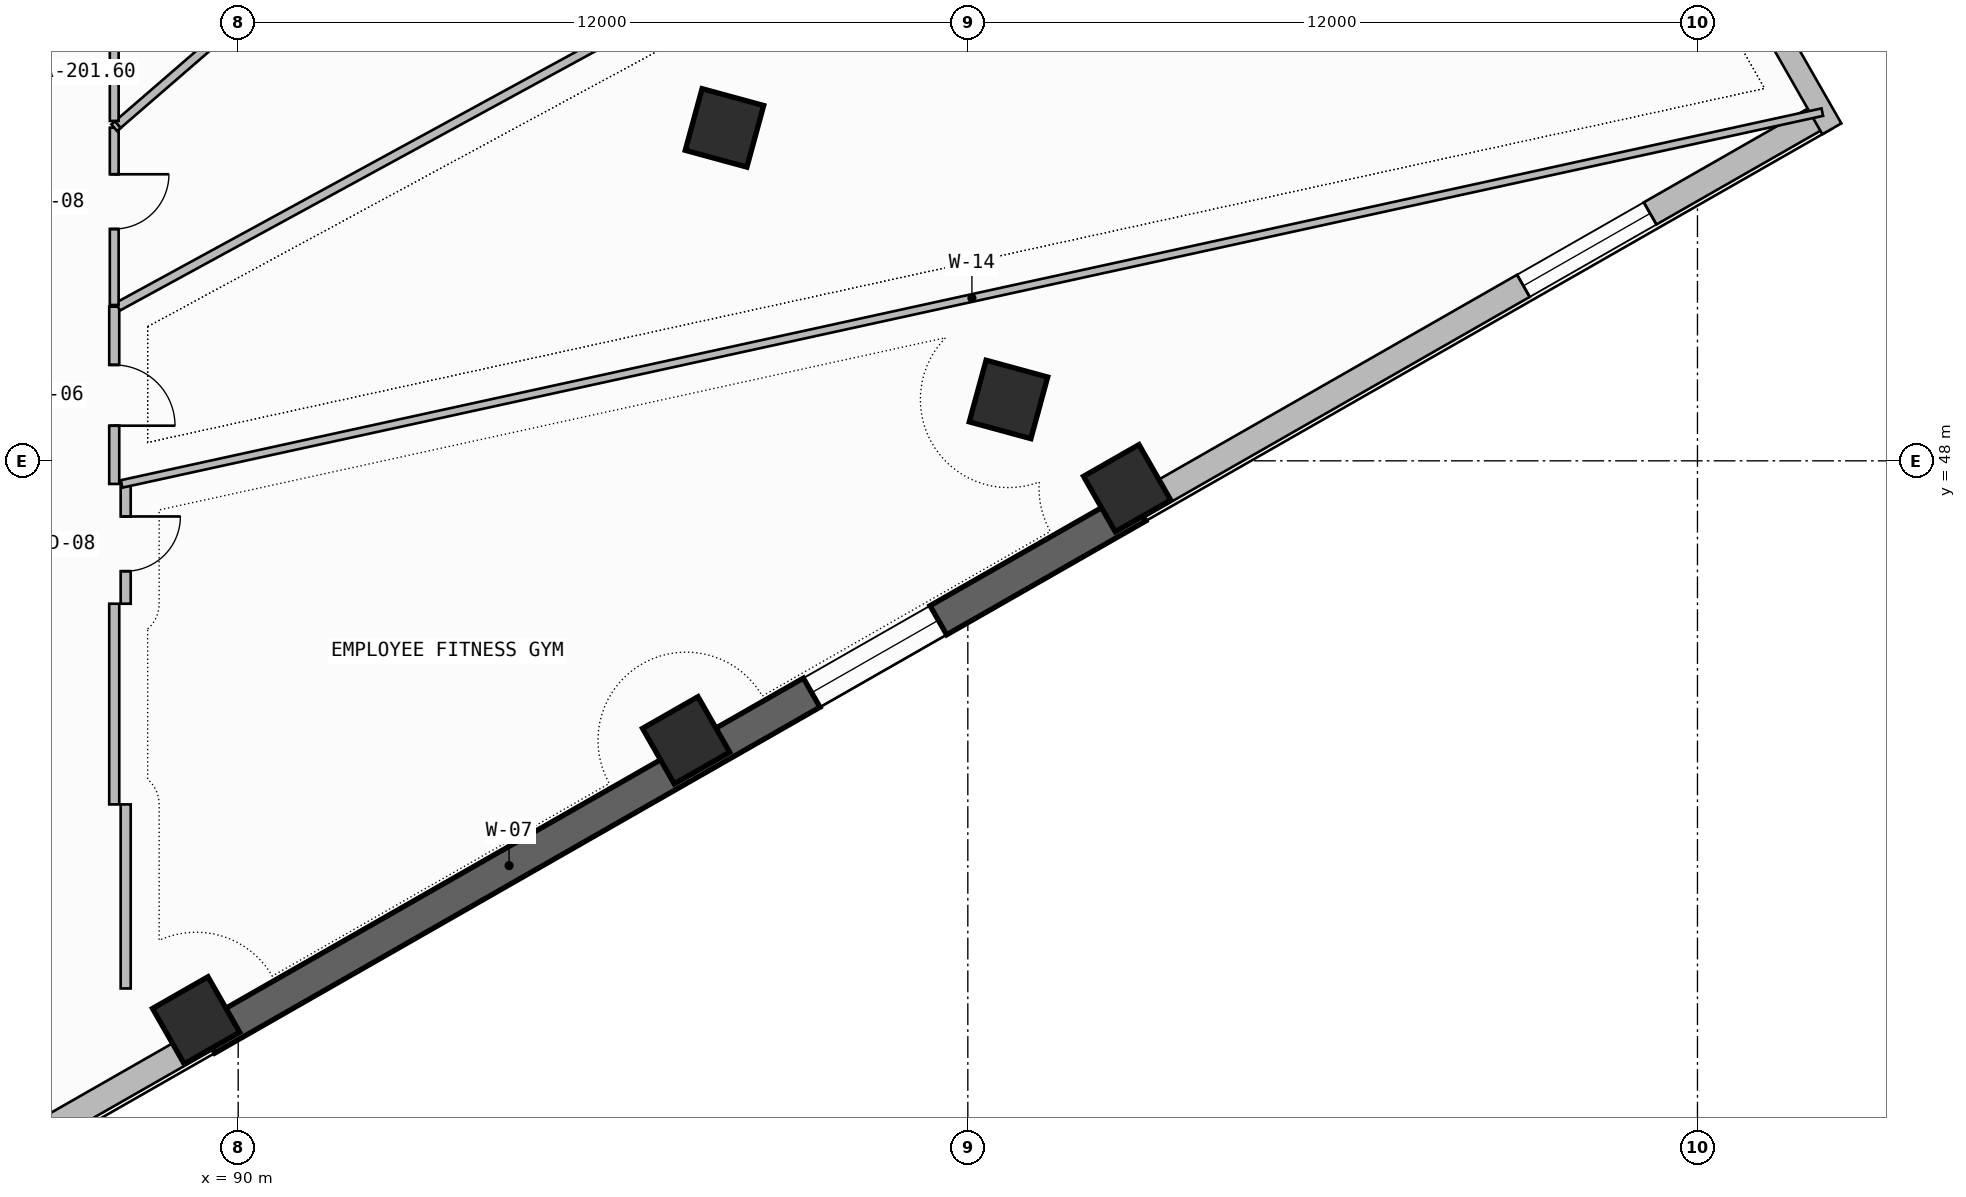
"""IFC4 building model, lengths in metres.
Left out: names, types, materials, properties, quantities, classifications, styles, units other than length and angle.
Written with IfcOpenShell. Run it as: python <this file> out.ifc"""

import sys

from ifc_helpers import new_model, si_unit, direction, frame, frame_2d, origin, origin_2d, place, context, subcontext, project, spatial, rectangle, extrude, element, fill, save


model = new_model("IFC4")
c1 = context("Model", 3, precision=1e-05, world=origin(), true_north=direction((0.0, 1.0)))
c2 = subcontext(c1, "Body", "Model", "MODEL_VIEW")
j1 = project(units=[si_unit("LENGTHUNIT", "METRE"), si_unit("PLANEANGLEUNIT", "RADIAN")], contexts=[c1])
p1 = place(None, origin())
s1 = spatial("IfcSite", under=j1, at=p1, CompositionType="ELEMENT")
p2 = place(p1, origin())
s2 = spatial("IfcBuilding", under=s1, at=p2, CompositionType="ELEMENT")
p3 = place(p2, frame((0.0, 0.0, 214.98)))
s3 = spatial("IfcBuildingStorey", under=s2, at=p3, CompositionType="ELEMENT", Elevation=214.98)
for number, where, z_axis, x_axis in (
    (1, (89.308, 38.799, 0.0), (0.0, 0.0, 1.0), (0.868, 0.496, 0.0)),
    (2, (97.367, 43.405, 0.0), (0.0, 0.0, 1.0), (0.868, 0.496, 0.0)),
    (3, (104.62, 47.55, 0.0), (0.0, 0.0, 1.0), (0.868, 0.496, 0.0)),
    (4, (102.669, 49.01, 0.0), (0.0, 0.0, 1.0), (0.263, 0.965, 0.0)),
    (5, (97.998, 53.475, 0.0), (0.0, 0.0, 1.0), (0.263, 0.965, 0.0)),
):
    element("IfcColumn", number, at=place(p3, frame(where, z_axis=z_axis, x_axis=x_axis)), inside=s3, PredefinedType="COLUMN", context=c2, shape_type="SweptSolid", body=[
        extrude(rectangle(XDim=1.05, YDim=1.05, at=origin_2d()), origin(), (0.0, 0.0, 1.0), 3.52),
    ])
p4 = place(p3, frame((86.1, 36.568, 0.0), z_axis=(0.0, 0.0, 1.0), x_axis=(0.868192956745, 0.496226752461, 0.0)))
e6 = element("IfcWall", 6, at=p4, inside=s3, PredefinedType="SOLIDWALL", context=c2, shape_type="SweptSolid", body=[
    extrude(rectangle(XDim=3.892, YDim=0.42, at=frame_2d((1.946, 0.0))), origin(), (0.0, 0.0, 1.0), 2.245),
])
p5 = place(p3, frame((89.479, 38.499, -0.26), z_axis=(0.0, 0.0, 1.0), x_axis=(0.868197136736, 0.496219439123, 0.0)))
e7 = element("IfcWall", 7, at=p5, inside=s3, PredefinedType="SHEAR", context=c2, shape_type="SweptSolid", body=[
    extrude(rectangle(XDim=17.636, YDim=0.55, at=frame_2d((8.818, 0.0))), origin(), (0.0, 0.0, 1.0), 3.52),
])
p6 = place(p5, frame((11.464, 0.0, 1.1)))
e8 = element("IfcOpeningElement", 8, at=p6, cuts=e7, PredefinedType="OPENING", context=c2, shape_type="SweptSolid", body=[
    extrude(rectangle(XDim=2.4, YDim=1.2, at=frame_2d((1.2, 0.6))), frame((0.0, 0.285, 0.0), z_axis=(0.0, -1.0, 0.0), x_axis=(1.0, 0.0, 0.0)), (0.0, 0.0, 1.0), 0.57),
])
p7 = place(p3, frame((104.791, 47.25, 0.0), z_axis=(0.0, 0.0, 1.0), x_axis=(0.868193423982, 0.496225934987, 0.0)))
e9 = element("IfcWall", 9, at=p7, inside=s3, PredefinedType="SOLIDWALL", context=c2, shape_type="SweptSolid", body=[
    extrude(rectangle(XDim=12.995, YDim=0.42, at=frame_2d((6.498, 0.0))), origin(), (0.0, 0.0, 1.0), 2.245),
])
p8 = place(p7, frame((7.31, 0.0, 0.965)))
e10 = element("IfcOpeningElement", 10, at=p8, cuts=e9, PredefinedType="OPENING", context=c2, shape_type="SweptSolid", body=[
    extrude(rectangle(XDim=2.4, YDim=1.2, at=frame_2d((1.2, 0.6))), frame((0.0, 0.22, 0.0), z_axis=(0.0, -1.0, 0.0), x_axis=(1.0, 0.0, 0.0)), (0.0, 0.0, 1.0), 0.44),
])
p9 = place(p3, frame((116.21, 53.46, 0.0), z_axis=(0.0, 0.0, 1.0), x_axis=(-0.496215637313, 0.868199309655, 0.0)))
e11 = element("IfcWall", 11, at=p9, inside=s3, PredefinedType="SOLIDWALL", context=c2, shape_type="SweptSolid", body=[
    extrude(rectangle(XDim=2.399, YDim=0.36, at=frame_2d((1.2, 0.0))), origin(), (0.0, 0.0, 1.0), 3.26),
])
p10 = place(p3, frame((87.961, 42.35, 0.0), z_axis=(0.0, 0.0, 1.0), x_axis=(0.0, 1.0, 0.0)))
e12 = element("IfcWall", 12, at=p10, inside=s3, PredefinedType="PARTITIONING", context=c2, shape_type="SweptSolid", body=[
    extrude(rectangle(XDim=3.3, YDim=0.165, at=frame_2d((1.65, 0.0))), origin(), (0.0, 0.0, 1.0), 2.745),
])
p11 = place(p3, frame((88.15, 39.323, 0.0), z_axis=(0.0, 0.0, 1.0), x_axis=(0.0, 1.0, 0.0)))
e13 = element("IfcWall", 13, at=p11, inside=s3, PredefinedType="PARTITIONING", context=c2, shape_type="SweptSolid", body=[
    extrude(rectangle(XDim=3.027, YDim=0.165, at=frame_2d((1.514, 0.0))), origin(), (0.0, 0.0, 1.0), 2.745),
])
p12 = place(p3, frame((88.15, 45.65, 0.0), z_axis=(0.0, 0.0, 1.0), x_axis=(0.0, 1.0, 0.0)))
e14 = element("IfcWall", 14, at=p12, inside=s3, PredefinedType="PARTITIONING", context=c2, shape_type="SweptSolid", body=[
    extrude(rectangle(XDim=1.97, YDim=0.165, at=frame_2d((0.985, 0.0))), origin(), (0.0, 0.0, 1.0), 3.26),
])
p13 = place(p12, frame((0.535, 0.0, 0.0)))
e15 = element("IfcOpeningElement", 15, at=p13, cuts=e14, PredefinedType="OPENING", context=c2, shape_type="SweptSolid", body=[
    extrude(rectangle(XDim=0.9, YDim=2.1, at=frame_2d((0.45, 1.05))), frame((0.0, 0.093, 0.0), z_axis=(0.0, -1.0, 0.0), x_axis=(1.0, 0.0, 0.0)), (0.0, 0.0, 1.0), 0.185),
])
p14 = place(p3, frame((88.082, 47.62, 0.0), z_axis=(0.0, 0.0, 1.0), x_axis=(0.976930213731, 0.21355879167, 0.0)))
e16 = element("IfcWall", 16, at=p14, inside=s3, PredefinedType="PARTITIONING", context=c2, shape_type="SweptSolid", body=[
    extrude(rectangle(XDim=28.631, YDim=0.125, at=frame_2d((14.316, 0.0))), origin(), (0.0, 0.0, 1.0), 2.645),
])
p15 = place(p3, frame((87.961, 47.62, 0.0), z_axis=(0.0, 0.0, 1.0), x_axis=(0.0, 1.0, 0.0)))
e17 = element("IfcWall", 17, at=p15, inside=s3, PredefinedType="PARTITIONING", context=c2, shape_type="SweptSolid", body=[
    extrude(rectangle(XDim=2.915, YDim=0.165, at=frame_2d((1.458, 0.0))), origin(), (0.0, 0.0, 1.0), 3.26),
])
p16 = place(p15, frame((0.958, 0.0, 0.0)))
e18 = element("IfcOpeningElement", 18, at=p16, cuts=e17, PredefinedType="OPENING", context=c2, shape_type="SweptSolid", body=[
    extrude(rectangle(XDim=1.0, YDim=2.2, at=frame_2d((0.5, 1.1))), frame((0.0, 0.093, 0.0), z_axis=(0.0, -1.0, 0.0), x_axis=(1.0, 0.0, 0.0)), (0.0, 0.0, 1.0), 0.185),
])
p17 = place(p3, frame((88.021, 50.535, 0.0), z_axis=(0.0, 0.0, 1.0), x_axis=(0.877922622052, 0.478802537264, 0.0)))
e19 = element("IfcWall", 19, at=p17, inside=s3, PredefinedType="PARTITIONING", context=c2, shape_type="SweptSolid", body=[
    extrude(rectangle(XDim=18.625, YDim=0.145, at=frame_2d((9.313, 0.0))), origin(), (0.0, 0.0, 1.0), 2.645),
])
p18 = place(p3, frame((87.961, 50.563, 0.0), z_axis=(0.0, 0.0, 1.0), x_axis=(0.0, 1.0, 0.0)))
e20 = element("IfcWall", 20, at=p18, inside=s3, PredefinedType="PARTITIONING", context=c2, shape_type="SweptSolid", body=[
    extrude(rectangle(XDim=2.915, YDim=0.145, at=frame_2d((1.458, 0.0))), origin(), (0.0, 0.0, 1.0), 3.26),
])
p19 = place(p18, frame((1.25, 0.0, 0.0)))
e21 = element("IfcOpeningElement", 21, at=p19, cuts=e20, PredefinedType="OPENING", context=c2, shape_type="SweptSolid", body=[
    extrude(rectangle(XDim=0.9, YDim=2.1, at=frame_2d((0.45, 1.05))), frame((0.0, 0.083, 0.0), z_axis=(0.0, -1.0, 0.0), x_axis=(1.0, 0.0, 0.0)), (0.0, 0.0, 1.0), 0.165),
])
p20 = place(p3, frame((87.961, 53.478, 0.0), z_axis=(0.0, 0.0, 1.0), x_axis=(0.757514976672, 0.652817784774, 0.0)))
e22 = element("IfcWall", 22, at=p20, inside=s3, PredefinedType="PARTITIONING", context=c2, shape_type="SweptSolid", body=[
    extrude(rectangle(XDim=0.079, YDim=0.145, at=frame_2d((0.04, 0.0))), origin(), (0.0, 0.0, 1.0), 3.26),
])
p21 = place(p3, frame((88.021, 53.53, 0.0), z_axis=(0.0, 0.0, 1.0), x_axis=(0.756178143134, 0.654365811948, 0.0)))
e23 = element("IfcWall", 23, at=p21, inside=s3, PredefinedType="PARTITIONING", context=c2, shape_type="SweptSolid", body=[
    extrude(rectangle(XDim=11.541, YDim=0.145, at=frame_2d((5.771, 0.0))), origin(), (0.0, 0.0, 1.0), 2.645),
])
p22 = place(p3, frame((87.961, 53.59, 0.0), z_axis=(0.0, 0.0, 1.0), x_axis=(0.0, 1.0, 0.0)))
e24 = element("IfcWall", 24, at=p22, inside=s3, PredefinedType="PARTITIONING", context=c2, shape_type="SweptSolid", body=[
    extrude(rectangle(XDim=5.272, YDim=0.145, at=frame_2d((2.636, 0.0))), origin(), (0.0, 0.0, 1.0), 2.745),
])
p23 = place(p22, frame((2.782, 0.0, 0.0)))
e25 = element("IfcOpeningElement", 25, at=p23, cuts=e24, PredefinedType="OPENING", context=c2, shape_type="SweptSolid", body=[
    extrude(rectangle(XDim=0.9, YDim=2.1, at=frame_2d((0.45, 1.05))), frame((0.0, 0.083, 0.0), z_axis=(0.0, -1.0, 0.0), x_axis=(1.0, 0.0, 0.0)), (0.0, 0.0, 1.0), 0.165),
])
p24 = place(p6, origin())
e26 = element("IfcWindow", 26, at=p24, inside=s3, PartitioningType="SINGLE_PANEL", PredefinedType="WINDOW", context=c2, shape_type="SweptSolid", body=[
    extrude(rectangle(XDim=2.4, YDim=1.2, at=frame_2d((1.2, 0.6))), frame((0.0, 0.03, 0.0), z_axis=(0.0, -1.0, 0.0), x_axis=(1.0, 0.0, 0.0)), (0.0, 0.0, 1.0), 0.06),
])
fill(e8, e26)
p25 = place(p8, origin())
e27 = element("IfcWindow", 27, at=p25, inside=s3, PartitioningType="SINGLE_PANEL", PredefinedType="WINDOW", context=c2, shape_type="SweptSolid", body=[
    extrude(rectangle(XDim=2.4, YDim=1.2, at=frame_2d((1.2, 0.6))), frame((0.0, 0.03, 0.0), z_axis=(0.0, -1.0, 0.0), x_axis=(1.0, 0.0, 0.0)), (0.0, 0.0, 1.0), 0.06),
])
fill(e10, e27)
p26 = place(p13, frame((0.9, 0.0, 0.0), z_axis=(0.0, 0.0, 1.0), x_axis=(-1.0, 0.0, 0.0)))
e28 = element("IfcDoor", 28, at=p26, inside=s3, OperationType="SINGLE_SWING_LEFT", PredefinedType="DOOR", context=c2, shape_type="SweptSolid", body=[
    extrude(rectangle(XDim=0.9, YDim=2.1, at=frame_2d((0.45, 1.05))), frame((0.0, 0.025, 0.0), z_axis=(0.0, -1.0, 0.0), x_axis=(1.0, 0.0, 0.0)), (0.0, 0.0, 1.0), 0.05),
])
fill(e15, e28)
p27 = place(p16, frame((1.0, 0.0, 0.0), z_axis=(0.0, 0.0, 1.0), x_axis=(-1.0, 0.0, 0.0)))
e29 = element("IfcDoor", 29, at=p27, inside=s3, OperationType="SINGLE_SWING_RIGHT", PredefinedType="DOOR", context=c2, shape_type="SweptSolid", body=[
    extrude(rectangle(XDim=1.0, YDim=2.2, at=frame_2d((0.5, 1.1))), frame((0.0, 0.025, 0.0), z_axis=(0.0, -1.0, 0.0), x_axis=(1.0, 0.0, 0.0)), (0.0, 0.0, 1.0), 0.05),
])
fill(e18, e29)
p28 = place(p19, frame((0.9, 0.0, 0.0), z_axis=(0.0, 0.0, 1.0), x_axis=(-1.0, 0.0, 0.0)))
e30 = element("IfcDoor", 30, at=p28, inside=s3, OperationType="SINGLE_SWING_LEFT", PredefinedType="DOOR", context=c2, shape_type="SweptSolid", body=[
    extrude(rectangle(XDim=0.9, YDim=2.1, at=frame_2d((0.45, 1.05))), frame((0.0, 0.025, 0.0), z_axis=(0.0, -1.0, 0.0), x_axis=(1.0, 0.0, 0.0)), (0.0, 0.0, 1.0), 0.05),
])
fill(e21, e30)
save(model, sys.argv[1])
